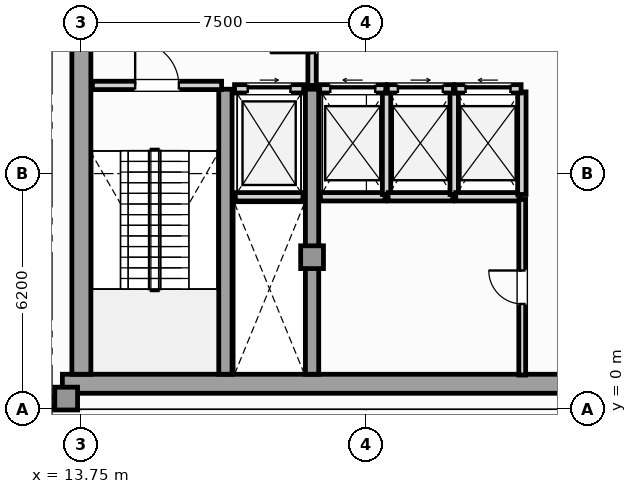
"""IFC4 building model, lengths in metres.
Left out: names, types, materials, properties, quantities, classifications, styles, units other than length and angle.
Written with IfcOpenShell. Run it as: python <this file> out.ifc"""

import sys

from ifc_helpers import new_model, si_unit, direction, frame, frame_2d, origin, origin_2d, place, context, subcontext, project, spatial, rectangle, extrude, element, fill, save


model = new_model("IFC4")
c1 = context("Model", 3, precision=1e-05, world=origin(), true_north=direction((0.0, 1.0)))
c2 = subcontext(c1, "Body", "Model", "MODEL_VIEW")
j1 = project(units=[si_unit("LENGTHUNIT", "METRE"), si_unit("PLANEANGLEUNIT", "RADIAN")], contexts=[c1])
p1 = place(None, origin())
s1 = spatial("IfcSite", under=j1, at=p1, CompositionType="ELEMENT")
p2 = place(p1, origin())
s2 = spatial("IfcBuilding", under=s1, at=p2, CompositionType="ELEMENT")
p3 = place(p2, frame((0.0, 0.0, 332.3)))
s3 = spatial("IfcBuildingStorey", under=s2, at=p3, CompositionType="ELEMENT", Elevation=332.3)
p4 = place(p3, frame((13.25, 0.67, 0.0), z_axis=(0.0, 0.0, 1.0), x_axis=(1.0, 0.0, 0.0)))
e1 = element("IfcWall", 1, at=p4, inside=s3, PredefinedType="SHEAR", context=c2, shape_type="SweptSolid", body=[
    extrude(rectangle(XDim=31.0, YDim=0.5, at=frame_2d((15.5, 0.0))), origin(), (0.0, 0.0, 1.0), 4.98),
])
p5 = place(p3, frame((13.75, 0.92, 0.0), z_axis=(0.0, 0.0, 1.0), x_axis=(0.0, 1.0, 0.0)))
e2 = element("IfcWall", 2, at=p5, inside=s3, PredefinedType="SHEAR", context=c2, shape_type="SweptSolid", body=[
    extrude(rectangle(XDim=10.53, YDim=0.5, at=frame_2d((5.265, 0.0))), origin(), (0.0, 0.0, 1.0), 4.98),
])
for number, where, z_axis, x_axis in (
    (3, (17.54, 0.92, 0.0), (0.0, 0.0, 1.0), (0.0, 1.0, 0.0)),
    (4, (19.82, 0.92, 0.0), (0.0, 0.0, 1.0), (0.0, 1.0, 0.0)),
):
    element("IfcWall", number, at=place(p3, frame(where, z_axis=z_axis, x_axis=x_axis)), inside=s3, PredefinedType="SHEAR", context=c2, shape_type="SweptSolid", body=[
        extrude(rectangle(XDim=7.5, YDim=0.35, at=frame_2d((3.75, 0.0))), origin(), (0.0, 0.0, 1.0), 4.98),
    ])
for number, where, z_axis, x_axis in (
    (5, (13.35, 0.28, 0.0), (0.0, 0.0, 1.0), (1.0, 0.0, 0.0)),
    (6, (19.82, 4.0, 0.0), (0.0, 0.0, 1.0), (1.0, 0.0, 0.0)),
):
    element("IfcColumn", number, at=place(p3, frame(where, z_axis=z_axis, x_axis=x_axis)), inside=s3, PredefinedType="COLUMN", context=c2, shape_type="SweptSolid", body=[
        extrude(rectangle(XDim=0.6, YDim=0.6, at=origin_2d()), origin(), (0.0, 0.0, 1.0), 5.2),
    ])
p6 = place(p3, frame((12.517, 0.18, 0.0), z_axis=(0.0, 0.0, 1.0), x_axis=(1.0, 0.0, 0.0)))
e7 = element("IfcWall", 7, at=p6, inside=s3, PredefinedType="SOLIDWALL", context=c2, shape_type="SweptSolid", body=[
    extrude(rectangle(XDim=0.733, YDim=0.26, at=frame_2d((0.366, 0.0))), origin(), (0.0, 0.0, 1.0), 4.98),
])
p7 = place(p3, frame((17.8, 5.59, 0.0), z_axis=(0.0, 0.0, 1.0), x_axis=(1.0, 0.0, 0.0)))
e8 = element("IfcWall", 8, at=p7, inside=s3, PredefinedType="SOLIDWALL", context=c2, shape_type="SweptSolid", body=[
    extrude(rectangle(XDim=1.78, YDim=0.22, at=frame_2d((0.89, 0.0))), origin(), (0.0, 0.0, 1.0), 4.98),
])
p8 = place(p3, frame((17.78, 8.43, 0.0), z_axis=(0.0, 0.0, 1.0), x_axis=(1.0, 0.0, 0.0)))
e9 = element("IfcWall", 9, at=p8, inside=s3, PredefinedType="SOLIDWALL", context=c2, shape_type="SweptSolid", body=[
    extrude(rectangle(XDim=1.82, YDim=0.22, at=frame_2d((0.91, 0.0))), origin(), (0.0, 0.0, 1.0), 4.98),
])
p9 = place(p8, frame((0.35, 0.0, 0.0)))
e10 = element("IfcOpeningElement", 10, at=p9, cuts=e9, PredefinedType="OPENING", context=c2, shape_type="SweptSolid", body=[
    extrude(rectangle(XDim=1.12, YDim=2.25, at=frame_2d((0.56, 1.125))), frame((0.0, 0.12, 0.0), z_axis=(0.0, -1.0, 0.0), x_axis=(1.0, 0.0, 0.0)), (0.0, 0.0, 1.0), 0.24),
])
p10 = place(p3, frame((20.04, 5.59, 0.0), z_axis=(0.0, 0.0, 1.0), x_axis=(1.0, 0.0, 0.0)))
e11 = element("IfcWall", 11, at=p10, inside=s3, PredefinedType="SOLIDWALL", context=c2, shape_type="SweptSolid", body=[
    extrude(rectangle(XDim=1.7, YDim=0.22, at=frame_2d((0.85, 0.0))), origin(), (0.0, 0.0, 1.0), 4.98),
])
p11 = place(p3, frame((21.78, 5.65, 0.0), z_axis=(0.0, 0.0, 1.0), x_axis=(0.0, 1.0, 0.0)))
e12 = element("IfcWall", 12, at=p11, inside=s3, PredefinedType="SOLIDWALL", context=c2, shape_type="SweptSolid", body=[
    extrude(rectangle(XDim=2.7, YDim=0.22, at=frame_2d((1.35, 0.0))), origin(), (0.0, 0.0, 1.0), 4.98),
])
p12 = place(p3, frame((20.02, 8.43, 0.0), z_axis=(0.0, 0.0, 1.0), x_axis=(1.0, 0.0, 0.0)))
e13 = element("IfcWall", 13, at=p12, inside=s3, PredefinedType="SOLIDWALL", context=c2, shape_type="SweptSolid", body=[
    extrude(rectangle(XDim=1.74, YDim=0.22, at=frame_2d((0.87, 0.0))), origin(), (0.0, 0.0, 1.0), 4.98),
])
p13 = place(p12, frame((0.28, 0.0, 0.0)))
e14 = element("IfcOpeningElement", 14, at=p13, cuts=e13, PredefinedType="OPENING", context=c2, shape_type="SweptSolid", body=[
    extrude(rectangle(XDim=1.18, YDim=2.2, at=frame_2d((0.59, 1.1))), frame((0.0, 0.12, 0.0), z_axis=(0.0, -1.0, 0.0), x_axis=(1.0, 0.0, 0.0)), (0.0, 0.0, 1.0), 0.24),
])
p14 = place(p3, frame((21.82, 5.59, 0.0), z_axis=(0.0, 0.0, 1.0), x_axis=(1.0, 0.0, 0.0)))
e15 = element("IfcWall", 15, at=p14, inside=s3, PredefinedType="SOLIDWALL", context=c2, shape_type="SweptSolid", body=[
    extrude(rectangle(XDim=1.7, YDim=0.22, at=frame_2d((0.85, 0.0))), origin(), (0.0, 0.0, 1.0), 4.98),
])
p15 = place(p3, frame((23.56, 5.65, 0.0), z_axis=(0.0, 0.0, 1.0), x_axis=(0.0, 1.0, 0.0)))
e16 = element("IfcWall", 16, at=p15, inside=s3, PredefinedType="SOLIDWALL", context=c2, shape_type="SweptSolid", body=[
    extrude(rectangle(XDim=2.7, YDim=0.22, at=frame_2d((1.35, 0.0))), origin(), (0.0, 0.0, 1.0), 4.98),
])
p16 = place(p3, frame((21.8, 8.43, 0.0), z_axis=(0.0, 0.0, 1.0), x_axis=(1.0, 0.0, 0.0)))
e17 = element("IfcWall", 17, at=p16, inside=s3, PredefinedType="SOLIDWALL", context=c2, shape_type="SweptSolid", body=[
    extrude(rectangle(XDim=1.74, YDim=0.22, at=frame_2d((0.87, 0.0))), origin(), (0.0, 0.0, 1.0), 4.98),
])
p17 = place(p16, frame((0.28, 0.0, 0.0)))
e18 = element("IfcOpeningElement", 18, at=p17, cuts=e17, PredefinedType="OPENING", context=c2, shape_type="SweptSolid", body=[
    extrude(rectangle(XDim=1.18, YDim=2.2, at=frame_2d((0.59, 1.1))), frame((0.0, 0.12, 0.0), z_axis=(0.0, -1.0, 0.0), x_axis=(1.0, 0.0, 0.0)), (0.0, 0.0, 1.0), 0.24),
])
p18 = place(p3, frame((23.6, 5.59, 0.0), z_axis=(0.0, 0.0, 1.0), x_axis=(1.0, 0.0, 0.0)))
e19 = element("IfcWall", 19, at=p18, inside=s3, PredefinedType="SOLIDWALL", context=c2, shape_type="SweptSolid", body=[
    extrude(rectangle(XDim=1.7, YDim=0.22, at=frame_2d((0.85, 0.0))), origin(), (0.0, 0.0, 1.0), 4.98),
])
p19 = place(p3, frame((25.34, 5.65, 0.0), z_axis=(0.0, 0.0, 1.0), x_axis=(0.0, 1.0, 0.0)))
e20 = element("IfcWall", 20, at=p19, inside=s3, PredefinedType="SOLIDWALL", context=c2, shape_type="SweptSolid", body=[
    extrude(rectangle(XDim=2.7, YDim=0.22, at=frame_2d((1.35, 0.0))), origin(), (0.0, 0.0, 1.0), 4.98),
])
p20 = place(p3, frame((23.58, 8.43, 0.0), z_axis=(0.0, 0.0, 1.0), x_axis=(1.0, 0.0, 0.0)))
e21 = element("IfcWall", 21, at=p20, inside=s3, PredefinedType="SOLIDWALL", context=c2, shape_type="SweptSolid", body=[
    extrude(rectangle(XDim=1.74, YDim=0.22, at=frame_2d((0.87, 0.0))), origin(), (0.0, 0.0, 1.0), 4.98),
])
p21 = place(p20, frame((0.28, 0.0, 0.0)))
e22 = element("IfcOpeningElement", 22, at=p21, cuts=e21, PredefinedType="OPENING", context=c2, shape_type="SweptSolid", body=[
    extrude(rectangle(XDim=1.18, YDim=2.2, at=frame_2d((0.59, 1.1))), frame((0.0, 0.12, 0.0), z_axis=(0.0, -1.0, 0.0), x_axis=(1.0, 0.0, 0.0)), (0.0, 0.0, 1.0), 0.24),
])
p22 = place(p3, frame((14.04, 8.52, 0.0), z_axis=(0.0, 0.0, 1.0), x_axis=(1.0, 0.0, 0.0)))
e23 = element("IfcWall", 23, at=p22, inside=s3, PredefinedType="SOLIDWALL", context=c2, shape_type="SweptSolid", body=[
    extrude(rectangle(XDim=3.4, YDim=0.22, at=frame_2d((1.7, 0.0))), origin(), (0.0, 0.0, 1.0), 4.98),
])
p23 = place(p22, frame((1.125, 0.0, 0.0)))
e24 = element("IfcOpeningElement", 24, at=p23, cuts=e23, PredefinedType="OPENING", context=c2, shape_type="SweptSolid", body=[
    extrude(rectangle(XDim=1.15, YDim=2.2, at=frame_2d((0.575, 1.1))), frame((0.0, 0.12, 0.0), z_axis=(0.0, -1.0, 0.0), x_axis=(1.0, 0.0, 0.0)), (0.0, 0.0, 1.0), 0.24),
])
p24 = place(p3, frame((19.82, 8.52, 0.0), z_axis=(0.0, 0.0, 1.0), x_axis=(0.0, 1.0, 0.0)))
e25 = element("IfcWall", 25, at=p24, inside=s3, PredefinedType="SOLIDWALL", context=c2, shape_type="SweptSolid", body=[
    extrude(rectangle(XDim=2.8, YDim=0.22, at=frame_2d((1.4, 0.0))), origin(), (0.0, 0.0, 1.0), 4.436),
])
p25 = place(p24, frame((0.85, 0.0, 0.0)))
e26 = element("IfcOpeningElement", 26, at=p25, cuts=e25, PredefinedType="OPENING", context=c2, shape_type="SweptSolid", body=[
    extrude(rectangle(XDim=1.1, YDim=2.2, at=frame_2d((0.55, 1.1))), frame((0.0, 0.12, 0.0), z_axis=(0.0, -1.0, 0.0), x_axis=(1.0, 0.0, 0.0)), (0.0, 0.0, 1.0), 0.24),
])
p26 = place(p3, frame((25.35, 0.9, 0.0), z_axis=(0.0, 0.0, 1.0), x_axis=(0.0, 1.0, 0.0)))
e27 = element("IfcWall", 27, at=p26, inside=s3, PredefinedType="PARTITIONING", context=c2, shape_type="SweptSolid", body=[
    extrude(rectangle(XDim=4.62, YDim=0.18, at=frame_2d((2.31, 0.0))), origin(), (0.0, 0.0, 1.0), 4.98),
])
p27 = place(p26, frame((1.87, 0.0, 0.0)))
e28 = element("IfcOpeningElement", 28, at=p27, cuts=e27, PredefinedType="OPENING", context=c2, shape_type="SweptSolid", body=[
    extrude(rectangle(XDim=0.88, YDim=2.05, at=frame_2d((0.44, 1.025))), frame((0.0, 0.1, 0.0), z_axis=(0.0, -1.0, 0.0), x_axis=(1.0, 0.0, 0.0)), (0.0, 0.0, 1.0), 0.2),
])
p28 = place(p9, origin())
e29 = element("IfcDoor", 29, at=p28, inside=s3, OperationType="SLIDING_TO_RIGHT", PredefinedType="DOOR", context=c2, shape_type="SweptSolid", body=[
    extrude(rectangle(XDim=1.12, YDim=2.25, at=frame_2d((0.56, 1.125))), frame((0.0, 0.025, 0.0), z_axis=(0.0, -1.0, 0.0), x_axis=(1.0, 0.0, 0.0)), (0.0, 0.0, 1.0), 0.05),
])
fill(e10, e29)
p29 = place(p13, origin())
e30 = element("IfcDoor", 30, at=p29, inside=s3, OperationType="SLIDING_TO_LEFT", PredefinedType="DOOR", context=c2, shape_type="SweptSolid", body=[
    extrude(rectangle(XDim=1.18, YDim=2.2, at=frame_2d((0.59, 1.1))), frame((0.0, 0.025, 0.0), z_axis=(0.0, -1.0, 0.0), x_axis=(1.0, 0.0, 0.0)), (0.0, 0.0, 1.0), 0.05),
])
fill(e14, e30)
p30 = place(p17, origin())
e31 = element("IfcDoor", 31, at=p30, inside=s3, OperationType="SLIDING_TO_RIGHT", PredefinedType="DOOR", context=c2, shape_type="SweptSolid", body=[
    extrude(rectangle(XDim=1.18, YDim=2.2, at=frame_2d((0.59, 1.1))), frame((0.0, 0.025, 0.0), z_axis=(0.0, -1.0, 0.0), x_axis=(1.0, 0.0, 0.0)), (0.0, 0.0, 1.0), 0.05),
])
fill(e18, e31)
p31 = place(p21, origin())
e32 = element("IfcDoor", 32, at=p31, inside=s3, OperationType="SLIDING_TO_LEFT", PredefinedType="DOOR", context=c2, shape_type="SweptSolid", body=[
    extrude(rectangle(XDim=1.18, YDim=2.2, at=frame_2d((0.59, 1.1))), frame((0.0, 0.025, 0.0), z_axis=(0.0, -1.0, 0.0), x_axis=(1.0, 0.0, 0.0)), (0.0, 0.0, 1.0), 0.05),
])
fill(e22, e32)
p32 = place(p23, origin())
e33 = element("IfcDoor", 33, at=p32, inside=s3, OperationType="SINGLE_SWING_LEFT", PredefinedType="DOOR", context=c2, shape_type="SweptSolid", body=[
    extrude(rectangle(XDim=1.15, YDim=2.2, at=frame_2d((0.575, 1.1))), frame((0.0, 0.025, 0.0), z_axis=(0.0, -1.0, 0.0), x_axis=(1.0, 0.0, 0.0)), (0.0, 0.0, 1.0), 0.05),
])
fill(e24, e33)
p33 = place(p25, origin())
e34 = element("IfcDoor", 34, at=p33, inside=s3, OperationType="SINGLE_SWING_LEFT", PredefinedType="DOOR", context=c2, shape_type="SweptSolid", body=[
    extrude(rectangle(XDim=1.1, YDim=2.2, at=frame_2d((0.55, 1.1))), frame((0.0, 0.025, 0.0), z_axis=(0.0, -1.0, 0.0), x_axis=(1.0, 0.0, 0.0)), (0.0, 0.0, 1.0), 0.05),
])
fill(e26, e34)
p34 = place(p27, origin())
e35 = element("IfcDoor", 35, at=p34, inside=s3, OperationType="SINGLE_SWING_RIGHT", PredefinedType="DOOR", context=c2, shape_type="SweptSolid", body=[
    extrude(rectangle(XDim=0.88, YDim=2.05, at=frame_2d((0.44, 1.025))), frame((0.0, 0.025, 0.0), z_axis=(0.0, -1.0, 0.0), x_axis=(1.0, 0.0, 0.0)), (0.0, 0.0, 1.0), 0.05),
])
fill(e28, e35)
save(model, sys.argv[1])
